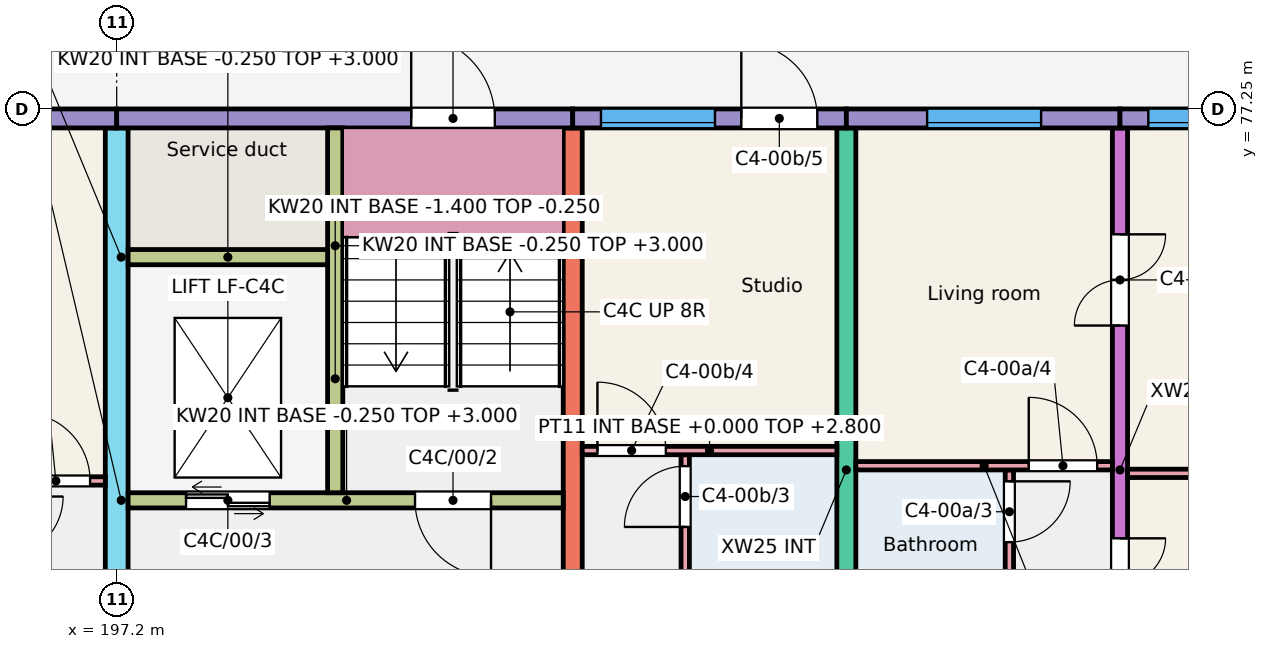
"""IFC4 building model, lengths in metres.
Left out: names, types, materials, properties, quantities, classifications, styles, units other than length and angle.
Written with IfcOpenShell. Run it as: python <this file> out.ifc"""

import sys

from ifc_helpers import new_model, si_unit, direction, frame, frame_2d, origin, place, context, subcontext, project, spatial, rectangle, extrude, element, fill, save


model = new_model("IFC4")
c1 = context("Model", 3, precision=1e-05, world=origin(), true_north=direction((0.0, 1.0)))
c2 = subcontext(c1, "Body", "Model", "MODEL_VIEW")
j1 = project(units=[si_unit("LENGTHUNIT", "METRE"), si_unit("PLANEANGLEUNIT", "RADIAN")], contexts=[c1])
p1 = place(None, origin())
s1 = spatial("IfcSite", under=j1, at=p1, CompositionType="ELEMENT")
p2 = place(p1, origin())
s2 = spatial("IfcBuilding", under=s1, at=p2, CompositionType="ELEMENT")
p3 = place(p2, origin())
s3 = spatial("IfcBuildingStorey", under=s2, at=p3, CompositionType="ELEMENT", Elevation=0.0)
p4 = place(p3, frame((197.2, 66.0, -0.25), z_axis=(0.0, 0.0, 1.0), x_axis=(0.0, 1.0, 0.0)))
e1 = element("IfcWall", 1, at=p4, inside=s3, PredefinedType="SHEAR", context=c2, shape_type="SweptSolid", body=[
    extrude(rectangle(XDim=11.0, YDim=0.3, at=frame_2d((5.5, 0.0))), origin(), (0.0, 0.0, 1.0), 3.25),
])
p5 = place(p4, frame((0.3, 0.0, 0.25)))
e2 = element("IfcOpeningElement", 2, at=p5, cuts=e1, PredefinedType="OPENING", context=c2, shape_type="SweptSolid", body=[
    extrude(rectangle(XDim=1.2, YDim=2.1, at=frame_2d((0.6, 1.05))), frame((0.0, 0.16, 0.0), z_axis=(0.0, -1.0, 0.0), x_axis=(1.0, 0.0, 0.0)), (0.0, 0.0, 1.0), 0.32),
])
for number, where, z_axis, x_axis in (
    (3, (203.2, 68.0, -0.25), (0.0, 0.0, 1.0), (0.0, 1.0, 0.0)),
    (4, (206.8, 68.0, -0.25), (0.0, 0.0, 1.0), (0.0, 1.0, 0.0)),
):
    element("IfcWall", number, at=place(p3, frame(where, z_axis=z_axis, x_axis=x_axis)), inside=s3, PredefinedType="SHEAR", context=c2, shape_type="SweptSolid", body=[
        extrude(rectangle(XDim=9.0, YDim=0.25, at=frame_2d((4.5, 0.0))), origin(), (0.0, 0.0, 1.0), 3.25),
    ])
p6 = place(p3, frame((210.4, 68.0, -0.25), z_axis=(0.0, 0.0, 1.0), x_axis=(0.0, 1.0, 0.0)))
e5 = element("IfcWall", 5, at=p6, inside=s3, PredefinedType="SHEAR", context=c2, shape_type="SweptSolid", body=[
    extrude(rectangle(XDim=9.0, YDim=0.2, at=frame_2d((4.5, 0.0))), origin(), (0.0, 0.0, 1.0), 3.25),
])
p7 = place(p6, frame((2.4, 0.0, 0.25)))
e6 = element("IfcOpeningElement", 6, at=p7, cuts=e5, PredefinedType="OPENING", context=c2, shape_type="SweptSolid", body=[
    extrude(rectangle(XDim=1.2, YDim=2.1, at=frame_2d((0.6, 1.05))), frame((0.0, 0.11, 0.0), z_axis=(0.0, -1.0, 0.0), x_axis=(1.0, 0.0, 0.0)), (0.0, 0.0, 1.0), 0.22),
])
p8 = place(p6, frame((6.4, 0.0, 0.25)))
e7 = element("IfcOpeningElement", 7, at=p8, cuts=e5, PredefinedType="OPENING", context=c2, shape_type="SweptSolid", body=[
    extrude(rectangle(XDim=1.2, YDim=2.1, at=frame_2d((0.6, 1.05))), frame((0.0, 0.11, 0.0), z_axis=(0.0, -1.0, 0.0), x_axis=(1.0, 0.0, 0.0)), (0.0, 0.0, 1.0), 0.22),
])
p9 = place(p3, frame((193.6, 77.125, -0.25), z_axis=(0.0, 0.0, 1.0), x_axis=(1.0, 0.0, 0.0)))
e8 = element("IfcWall", 8, at=p9, inside=s3, PredefinedType="SOLIDWALL", context=c2, shape_type="SweptSolid", body=[
    extrude(rectangle(XDim=3.6, YDim=0.25, at=frame_2d((1.8, 0.0))), origin(), (0.0, 0.0, 1.0), 3.25),
])
p10 = place(p9, frame((1.038, 0.0, 1.15)))
e9 = element("IfcOpeningElement", 9, at=p10, cuts=e8, PredefinedType="OPENING", context=c2, shape_type="SweptSolid", body=[
    extrude(rectangle(XDim=1.5, YDim=1.5, at=frame_2d((0.75, 0.75))), frame((0.0, 0.135, 0.0), z_axis=(0.0, -1.0, 0.0), x_axis=(1.0, 0.0, 0.0)), (0.0, 0.0, 1.0), 0.27),
])
p11 = place(p3, frame((197.2, 77.125, -0.25), z_axis=(0.0, 0.0, 1.0), x_axis=(1.0, 0.0, 0.0)))
e10 = element("IfcWall", 10, at=p11, inside=s3, PredefinedType="SOLIDWALL", context=c2, shape_type="SweptSolid", body=[
    extrude(rectangle(XDim=6.0, YDim=0.25, at=frame_2d((3.0, 0.0))), origin(), (0.0, 0.0, 1.0), 3.25),
])
p12 = place(p11, frame((3.875, 0.0, 0.25)))
e11 = element("IfcOpeningElement", 11, at=p12, cuts=e10, PredefinedType="OPENING", context=c2, shape_type="SweptSolid", body=[
    extrude(rectangle(XDim=1.1, YDim=2.1, at=frame_2d((0.55, 1.05))), frame((0.0, 0.135, 0.0), z_axis=(0.0, -1.0, 0.0), x_axis=(1.0, 0.0, 0.0)), (0.0, 0.0, 1.0), 0.27),
])
p13 = place(p3, frame((197.35, 72.1, -0.25), z_axis=(0.0, 0.0, 1.0), x_axis=(1.0, 0.0, 0.0)))
e12 = element("IfcWall", 12, at=p13, inside=s3, PredefinedType="SHEAR", context=c2, shape_type="SweptSolid", body=[
    extrude(rectangle(XDim=5.725, YDim=0.2, at=frame_2d((2.862, 0.0))), origin(), (0.0, 0.0, 1.0), 3.25),
])
p14 = place(p13, frame((3.775, 0.0, 0.25)))
e13 = element("IfcOpeningElement", 13, at=p14, cuts=e12, PredefinedType="OPENING", context=c2, shape_type="SweptSolid", body=[
    extrude(rectangle(XDim=1.0, YDim=2.1, at=frame_2d((0.5, 1.05))), frame((0.0, 0.11, 0.0), z_axis=(0.0, -1.0, 0.0), x_axis=(1.0, 0.0, 0.0)), (0.0, 0.0, 1.0), 0.22),
])
p15 = place(p13, frame((0.762, 0.0, 0.25)))
e14 = element("IfcOpeningElement", 14, at=p15, cuts=e12, PredefinedType="OPENING", context=c2, shape_type="SweptSolid", body=[
    extrude(rectangle(XDim=1.1, YDim=2.1, at=frame_2d((0.55, 1.05))), frame((0.0, 0.11, 0.0), z_axis=(0.0, -1.0, 0.0), x_axis=(1.0, 0.0, 0.0)), (0.0, 0.0, 1.0), 0.22),
])
p16 = place(p3, frame((200.075, 72.2, -0.25), z_axis=(0.0, 0.0, 1.0), x_axis=(0.0, 1.0, 0.0)))
e15 = element("IfcWall", 15, at=p16, inside=s3, PredefinedType="SHEAR", context=c2, shape_type="SweptSolid", body=[
    extrude(rectangle(XDim=4.8, YDim=0.2, at=frame_2d((2.4, 0.0))), origin(), (0.0, 0.0, 1.0), 3.25),
])
p17 = place(p3, frame((197.35, 75.3, -0.25), z_axis=(0.0, 0.0, 1.0), x_axis=(1.0, 0.0, 0.0)))
e16 = element("IfcWall", 16, at=p17, inside=s3, PredefinedType="SHEAR", context=c2, shape_type="SweptSolid", body=[
    extrude(rectangle(XDim=2.625, YDim=0.2, at=frame_2d((1.312, 0.0))), origin(), (0.0, 0.0, 1.0), 3.25),
])
p18 = place(p3, frame((203.2, 77.125, -0.25), z_axis=(0.0, 0.0, 1.0), x_axis=(1.0, 0.0, 0.0)))
e17 = element("IfcWall", 17, at=p18, inside=s3, PredefinedType="SOLIDWALL", context=c2, shape_type="SweptSolid", body=[
    extrude(rectangle(XDim=3.6, YDim=0.25, at=frame_2d((1.8, 0.0))), origin(), (0.0, 0.0, 1.0), 3.25),
])
p19 = place(p18, frame((0.372, 0.0, 1.15)))
e18 = element("IfcOpeningElement", 18, at=p19, cuts=e17, PredefinedType="OPENING", context=c2, shape_type="SweptSolid", body=[
    extrude(rectangle(XDim=1.5, YDim=1.5, at=frame_2d((0.75, 0.75))), frame((0.0, 0.135, 0.0), z_axis=(0.0, -1.0, 0.0), x_axis=(1.0, 0.0, 0.0)), (0.0, 0.0, 1.0), 0.27),
])
p20 = place(p18, frame((2.218, 0.0, 0.25)))
e19 = element("IfcOpeningElement", 19, at=p20, cuts=e17, PredefinedType="OPENING", context=c2, shape_type="SweptSolid", body=[
    extrude(rectangle(XDim=1.0, YDim=2.1, at=frame_2d((0.5, 1.05))), frame((0.0, 0.135, 0.0), z_axis=(0.0, -1.0, 0.0), x_axis=(1.0, 0.0, 0.0)), (0.0, 0.0, 1.0), 0.27),
])
p21 = place(p3, frame((206.8, 77.125, -0.25), z_axis=(0.0, 0.0, 1.0), x_axis=(1.0, 0.0, 0.0)))
e20 = element("IfcWall", 20, at=p21, inside=s3, PredefinedType="SOLIDWALL", context=c2, shape_type="SweptSolid", body=[
    extrude(rectangle(XDim=3.6, YDim=0.25, at=frame_2d((1.8, 0.0))), origin(), (0.0, 0.0, 1.0), 3.25),
])
p22 = place(p21, frame((1.062, 0.0, 1.15)))
e21 = element("IfcOpeningElement", 21, at=p22, cuts=e20, PredefinedType="OPENING", context=c2, shape_type="SweptSolid", body=[
    extrude(rectangle(XDim=1.5, YDim=1.5, at=frame_2d((0.75, 0.75))), frame((0.0, 0.135, 0.0), z_axis=(0.0, -1.0, 0.0), x_axis=(1.0, 0.0, 0.0)), (0.0, 0.0, 1.0), 0.27),
])
p23 = place(p3, frame((210.4, 77.125, -0.25), z_axis=(0.0, 0.0, 1.0), x_axis=(1.0, 0.0, 0.0)))
e22 = element("IfcWall", 22, at=p23, inside=s3, PredefinedType="SOLIDWALL", context=c2, shape_type="SweptSolid", body=[
    extrude(rectangle(XDim=3.6, YDim=0.25, at=frame_2d((1.8, 0.0))), origin(), (0.0, 0.0, 1.0), 3.25),
])
p24 = place(p23, frame((0.373, 0.0, 1.15)))
e23 = element("IfcOpeningElement", 23, at=p24, cuts=e22, PredefinedType="OPENING", context=c2, shape_type="SweptSolid", body=[
    extrude(rectangle(XDim=1.5, YDim=1.5, at=frame_2d((0.75, 0.75))), frame((0.0, 0.135, 0.0), z_axis=(0.0, -1.0, 0.0), x_axis=(1.0, 0.0, 0.0)), (0.0, 0.0, 1.0), 0.27),
])
p25 = place(p23, frame((2.246, 0.0, 0.25)))
e24 = element("IfcOpeningElement", 24, at=p25, cuts=e22, PredefinedType="OPENING", context=c2, shape_type="SweptSolid", body=[
    extrude(rectangle(XDim=1.0, YDim=2.1, at=frame_2d((0.5, 1.05))), frame((0.0, 0.135, 0.0), z_axis=(0.0, -1.0, 0.0), x_axis=(1.0, 0.0, 0.0)), (0.0, 0.0, 1.0), 0.27),
])
for number, where, z_axis, x_axis in (
    (25, (197.2, 72.1, -1.4), (0.0, 0.0, 1.0), (1.0, 0.0, 0.0)),
    (26, (197.2, 75.3, -1.4), (0.0, 0.0, 1.0), (1.0, 0.0, 0.0)),
):
    element("IfcWall", number, at=place(p3, frame(where, z_axis=z_axis, x_axis=x_axis)), inside=s3, PredefinedType="SHEAR", context=c2, shape_type="SweptSolid", body=[
        extrude(rectangle(XDim=2.975, YDim=0.2, at=frame_2d((1.488, 0.0))), origin(), (0.0, 0.0, 1.0), 1.15),
    ])
p26 = place(p3, frame((200.075, 72.2, -1.4), z_axis=(0.0, 0.0, 1.0), x_axis=(0.0, 1.0, 0.0)))
e27 = element("IfcWall", 27, at=p26, inside=s3, PredefinedType="SHEAR", context=c2, shape_type="SweptSolid", body=[
    extrude(rectangle(XDim=3.0, YDim=0.2, at=frame_2d((1.5, 0.0))), origin(), (0.0, 0.0, 1.0), 1.15),
])
p27 = place(p3, frame((197.275, 72.2, -1.4), z_axis=(0.0, 0.0, 1.0), x_axis=(0.0, 1.0, 0.0)))
e28 = element("IfcWall", 28, at=p27, inside=s3, PredefinedType="SHEAR", context=c2, shape_type="SweptSolid", body=[
    extrude(rectangle(XDim=3.0, YDim=0.15, at=frame_2d((1.5, 0.0))), origin(), (0.0, 0.0, 1.0), 1.15),
])
p28 = place(p3, frame((193.725, 72.355, 0.0), z_axis=(0.0, 0.0, 1.0), x_axis=(1.0, 0.0, 0.0)))
e29 = element("IfcWall", 29, at=p28, inside=s3, PredefinedType="PARTITIONING", context=c2, shape_type="SweptSolid", body=[
    extrude(rectangle(XDim=3.325, YDim=0.11, at=frame_2d((1.663, 0.0))), origin(), (0.0, 0.0, 1.0), 2.8),
])
p29 = place(p28, frame((2.225, 0.0, 0.0)))
e30 = element("IfcOpeningElement", 30, at=p29, cuts=e29, PredefinedType="OPENING", context=c2, shape_type="SweptSolid", body=[
    extrude(rectangle(XDim=0.9, YDim=2.1, at=frame_2d((0.45, 1.05))), frame((0.0, 0.065, 0.0), z_axis=(0.0, -1.0, 0.0), x_axis=(1.0, 0.0, 0.0)), (0.0, 0.0, 1.0), 0.13),
])
p30 = place(p3, frame((208.945, 68.0, 0.0), z_axis=(0.0, 0.0, 1.0), x_axis=(0.0, 1.0, 0.0)))
e31 = element("IfcWall", 31, at=p30, inside=s3, PredefinedType="PARTITIONING", context=c2, shape_type="SweptSolid", body=[
    extrude(rectangle(XDim=4.5, YDim=0.11, at=frame_2d((2.25, 0.0))), origin(), (0.0, 0.0, 1.0), 2.8),
])
p31 = place(p30, frame((0.2, 0.0, 0.0)))
e32 = element("IfcOpeningElement", 32, at=p31, cuts=e31, PredefinedType="OPENING", context=c2, shape_type="SweptSolid", body=[
    extrude(rectangle(XDim=0.8, YDim=2.1, at=frame_2d((0.4, 1.05))), frame((0.0, 0.065, 0.0), z_axis=(0.0, -1.0, 0.0), x_axis=(1.0, 0.0, 0.0)), (0.0, 0.0, 1.0), 0.13),
])
p32 = place(p30, frame((3.55, 0.0, 0.0)))
e33 = element("IfcOpeningElement", 33, at=p32, cuts=e31, PredefinedType="OPENING", context=c2, shape_type="SweptSolid", body=[
    extrude(rectangle(XDim=0.8, YDim=2.1, at=frame_2d((0.4, 1.05))), frame((0.0, 0.065, 0.0), z_axis=(0.0, -1.0, 0.0), x_axis=(1.0, 0.0, 0.0)), (0.0, 0.0, 1.0), 0.13),
])
p33 = place(p3, frame((206.925, 72.555, 0.0), z_axis=(0.0, 0.0, 1.0), x_axis=(1.0, 0.0, 0.0)))
e34 = element("IfcWall", 34, at=p33, inside=s3, PredefinedType="PARTITIONING", context=c2, shape_type="SweptSolid", body=[
    extrude(rectangle(XDim=3.375, YDim=0.11, at=frame_2d((1.688, 0.0))), origin(), (0.0, 0.0, 1.0), 2.8),
])
p34 = place(p33, frame((2.275, 0.0, 0.0)))
e35 = element("IfcOpeningElement", 35, at=p34, cuts=e34, PredefinedType="OPENING", context=c2, shape_type="SweptSolid", body=[
    extrude(rectangle(XDim=0.9, YDim=2.1, at=frame_2d((0.45, 1.05))), frame((0.0, 0.065, 0.0), z_axis=(0.0, -1.0, 0.0), x_axis=(1.0, 0.0, 0.0)), (0.0, 0.0, 1.0), 0.13),
])
p35 = place(p3, frame((210.5, 72.455, 0.0), z_axis=(0.0, 0.0, 1.0), x_axis=(1.0, 0.0, 0.0)))
e36 = element("IfcWall", 36, at=p35, inside=s3, PredefinedType="PARTITIONING", context=c2, shape_type="SweptSolid", body=[
    extrude(rectangle(XDim=3.35, YDim=0.11, at=frame_2d((1.675, 0.0))), origin(), (0.0, 0.0, 1.0), 2.8),
])
p36 = place(p3, frame((204.68, 68.0, 0.0), z_axis=(0.0, 0.0, 1.0), x_axis=(0.0, 1.0, 0.0)))
e37 = element("IfcWall", 37, at=p36, inside=s3, PredefinedType="PARTITIONING", context=c2, shape_type="SweptSolid", body=[
    extrude(rectangle(XDim=4.7, YDim=0.11, at=frame_2d((2.35, 0.0))), origin(), (0.0, 0.0, 1.0), 2.8),
])
p37 = place(p36, frame((0.2, 0.0, 0.0)))
e38 = element("IfcOpeningElement", 38, at=p37, cuts=e37, PredefinedType="OPENING", context=c2, shape_type="SweptSolid", body=[
    extrude(rectangle(XDim=0.8, YDim=2.1, at=frame_2d((0.4, 1.05))), frame((0.0, 0.065, 0.0), z_axis=(0.0, -1.0, 0.0), x_axis=(1.0, 0.0, 0.0)), (0.0, 0.0, 1.0), 0.13),
])
p38 = place(p36, frame((3.75, 0.0, 0.0)))
e39 = element("IfcOpeningElement", 39, at=p38, cuts=e37, PredefinedType="OPENING", context=c2, shape_type="SweptSolid", body=[
    extrude(rectangle(XDim=0.8, YDim=2.1, at=frame_2d((0.4, 1.05))), frame((0.0, 0.065, 0.0), z_axis=(0.0, -1.0, 0.0), x_axis=(1.0, 0.0, 0.0)), (0.0, 0.0, 1.0), 0.13),
])
p39 = place(p3, frame((203.325, 72.755, 0.0), z_axis=(0.0, 0.0, 1.0), x_axis=(1.0, 0.0, 0.0)))
e40 = element("IfcWall", 40, at=p39, inside=s3, PredefinedType="PARTITIONING", context=c2, shape_type="SweptSolid", body=[
    extrude(rectangle(XDim=3.35, YDim=0.11, at=frame_2d((1.675, 0.0))), origin(), (0.0, 0.0, 1.0), 2.8),
])
p40 = place(p39, frame((0.2, 0.0, 0.0)))
e41 = element("IfcOpeningElement", 41, at=p40, cuts=e40, PredefinedType="OPENING", context=c2, shape_type="SweptSolid", body=[
    extrude(rectangle(XDim=0.9, YDim=2.1, at=frame_2d((0.45, 1.05))), frame((0.0, 0.065, 0.0), z_axis=(0.0, -1.0, 0.0), x_axis=(1.0, 0.0, 0.0)), (0.0, 0.0, 1.0), 0.13),
])
p41 = place(p24, origin())
e42 = element("IfcWindow", 42, at=p41, inside=s3, PartitioningType="SINGLE_PANEL", PredefinedType="WINDOW", context=c2, shape_type="SweptSolid", body=[
    extrude(rectangle(XDim=1.5, YDim=1.5, at=frame_2d((0.75, 0.75))), frame((0.0, -0.025, 0.0), z_axis=(0.0, -1.0, 0.0), x_axis=(1.0, 0.0, 0.0)), (0.0, 0.0, 1.0), 0.06),
])
fill(e23, e42)
p42 = place(p22, origin())
e43 = element("IfcWindow", 43, at=p42, inside=s3, PartitioningType="SINGLE_PANEL", PredefinedType="WINDOW", context=c2, shape_type="SweptSolid", body=[
    extrude(rectangle(XDim=1.5, YDim=1.5, at=frame_2d((0.75, 0.75))), frame((0.0, -0.025, 0.0), z_axis=(0.0, -1.0, 0.0), x_axis=(1.0, 0.0, 0.0)), (0.0, 0.0, 1.0), 0.06),
])
fill(e21, e43)
p43 = place(p19, origin())
e44 = element("IfcWindow", 44, at=p43, inside=s3, PartitioningType="SINGLE_PANEL", PredefinedType="WINDOW", context=c2, shape_type="SweptSolid", body=[
    extrude(rectangle(XDim=1.5, YDim=1.5, at=frame_2d((0.75, 0.75))), frame((0.0, -0.025, 0.0), z_axis=(0.0, -1.0, 0.0), x_axis=(1.0, 0.0, 0.0)), (0.0, 0.0, 1.0), 0.06),
])
fill(e18, e44)
p44 = place(p29, origin())
e45 = element("IfcDoor", 45, at=p44, inside=s3, OperationType="SINGLE_SWING_LEFT", PredefinedType="DOOR", context=c2, shape_type="SweptSolid", body=[
    extrude(rectangle(XDim=0.9, YDim=2.1, at=frame_2d((0.45, 1.05))), frame((0.0, 0.025, 0.0), z_axis=(0.0, -1.0, 0.0), x_axis=(1.0, 0.0, 0.0)), (0.0, 0.0, 1.0), 0.05),
])
fill(e30, e45)
p45 = place(p32, origin())
e46 = element("IfcDoor", 46, at=p45, inside=s3, OperationType="SINGLE_SWING_RIGHT", PredefinedType="DOOR", context=c2, shape_type="SweptSolid", body=[
    extrude(rectangle(XDim=0.8, YDim=2.1, at=frame_2d((0.4, 1.05))), frame((0.0, 0.025, 0.0), z_axis=(0.0, -1.0, 0.0), x_axis=(1.0, 0.0, 0.0)), (0.0, 0.0, 1.0), 0.05),
])
fill(e33, e46)
p46 = place(p34, origin())
e47 = element("IfcDoor", 47, at=p46, inside=s3, OperationType="SINGLE_SWING_LEFT", PredefinedType="DOOR", context=c2, shape_type="SweptSolid", body=[
    extrude(rectangle(XDim=0.9, YDim=2.1, at=frame_2d((0.45, 1.05))), frame((0.0, 0.025, 0.0), z_axis=(0.0, -1.0, 0.0), x_axis=(1.0, 0.0, 0.0)), (0.0, 0.0, 1.0), 0.05),
])
fill(e35, e47)
p47 = place(p7, origin())
e48 = element("IfcDoor", 48, at=p47, inside=s3, OperationType="DOUBLE_DOOR_SINGLE_SWING", PredefinedType="DOOR", context=c2, shape_type="SweptSolid", body=[
    extrude(rectangle(XDim=1.2, YDim=2.1, at=frame_2d((0.6, 1.05))), frame((0.0, 0.025, 0.0), z_axis=(0.0, -1.0, 0.0), x_axis=(1.0, 0.0, 0.0)), (0.0, 0.0, 1.0), 0.05),
])
fill(e6, e48)
p48 = place(p8, origin())
e49 = element("IfcDoor", 49, at=p48, inside=s3, OperationType="DOUBLE_DOOR_SINGLE_SWING", PredefinedType="DOOR", context=c2, shape_type="SweptSolid", body=[
    extrude(rectangle(XDim=1.2, YDim=2.1, at=frame_2d((0.6, 1.05))), frame((0.0, 0.025, 0.0), z_axis=(0.0, -1.0, 0.0), x_axis=(1.0, 0.0, 0.0)), (0.0, 0.0, 1.0), 0.05),
])
fill(e7, e49)
p49 = place(p38, origin())
e50 = element("IfcDoor", 50, at=p49, inside=s3, OperationType="SINGLE_SWING_LEFT", PredefinedType="DOOR", context=c2, shape_type="SweptSolid", body=[
    extrude(rectangle(XDim=0.8, YDim=2.1, at=frame_2d((0.4, 1.05))), frame((0.0, 0.025, 0.0), z_axis=(0.0, -1.0, 0.0), x_axis=(1.0, 0.0, 0.0)), (0.0, 0.0, 1.0), 0.05),
])
fill(e39, e50)
p50 = place(p40, origin())
e51 = element("IfcDoor", 51, at=p50, inside=s3, OperationType="SINGLE_SWING_LEFT", PredefinedType="DOOR", context=c2, shape_type="SweptSolid", body=[
    extrude(rectangle(XDim=0.9, YDim=2.1, at=frame_2d((0.45, 1.05))), frame((0.0, 0.025, 0.0), z_axis=(0.0, -1.0, 0.0), x_axis=(1.0, 0.0, 0.0)), (0.0, 0.0, 1.0), 0.05),
])
fill(e41, e51)
p51 = place(p20, origin())
e52 = element("IfcDoor", 52, at=p51, inside=s3, OperationType="SINGLE_SWING_LEFT", PredefinedType="DOOR", context=c2, shape_type="SweptSolid", body=[
    extrude(rectangle(XDim=1.0, YDim=2.1, at=frame_2d((0.5, 1.05))), frame((0.0, 0.025, 0.0), z_axis=(0.0, -1.0, 0.0), x_axis=(1.0, 0.0, 0.0)), (0.0, 0.0, 1.0), 0.05),
])
fill(e19, e52)
p52 = place(p14, origin())
e53 = element("IfcDoor", 53, at=p52, inside=s3, OperationType="SINGLE_SWING_RIGHT", PredefinedType="DOOR", context=c2, shape_type="SweptSolid", body=[
    extrude(rectangle(XDim=1.0, YDim=2.1, at=frame_2d((0.5, 1.05))), frame((0.0, 0.025, 0.0), z_axis=(0.0, -1.0, 0.0), x_axis=(1.0, 0.0, 0.0)), (0.0, 0.0, 1.0), 0.05),
])
fill(e13, e53)
p53 = place(p15, origin())
e54 = element("IfcDoor", 54, at=p53, inside=s3, OperationType="DOUBLE_DOOR_SLIDING", PredefinedType="DOOR", context=c2, shape_type="SweptSolid", body=[
    extrude(rectangle(XDim=1.1, YDim=2.1, at=frame_2d((0.55, 1.05))), frame((0.0, 0.025, 0.0), z_axis=(0.0, -1.0, 0.0), x_axis=(1.0, 0.0, 0.0)), (0.0, 0.0, 1.0), 0.05),
])
fill(e14, e54)
p54 = place(p12, origin())
e55 = element("IfcDoor", 55, at=p54, inside=s3, OperationType="SINGLE_SWING_LEFT", PredefinedType="DOOR", context=c2, shape_type="SweptSolid", body=[
    extrude(rectangle(XDim=1.1, YDim=2.1, at=frame_2d((0.55, 1.05))), frame((0.0, 0.025, 0.0), z_axis=(0.0, -1.0, 0.0), x_axis=(1.0, 0.0, 0.0)), (0.0, 0.0, 1.0), 0.05),
])
fill(e11, e55)
save(model, sys.argv[1])
